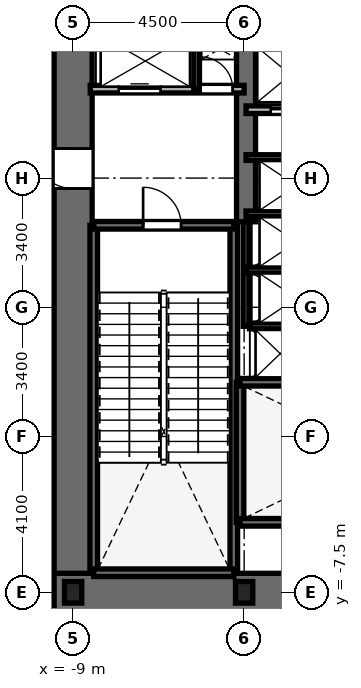
"""IFC4 building model, lengths in metres.
Left out: names, types, materials, properties, quantities, classifications, styles, units other than length and angle.
Written with IfcOpenShell. Run it as: python <this file> out.ifc"""

import sys

from ifc_helpers import new_model, si_unit, direction, frame, frame_2d, origin, origin_2d, place, context, subcontext, project, spatial, rectangle, i_section, extrude, element, fill, save


model = new_model("IFC4")
c1 = context("Model", 3, precision=1e-05, world=origin(), true_north=direction((0.0, 1.0)))
c2 = subcontext(c1, "Body", "Model", "MODEL_VIEW")
j1 = project(units=[si_unit("LENGTHUNIT", "METRE"), si_unit("PLANEANGLEUNIT", "RADIAN")], contexts=[c1])
p1 = place(None, origin())
s1 = spatial("IfcSite", under=j1, at=p1, CompositionType="ELEMENT")
p2 = place(p1, origin())
s2 = spatial("IfcBuilding", under=s1, at=p2, CompositionType="ELEMENT")
p3 = place(p2, origin())
s3 = spatial("IfcBuildingStorey", under=s2, at=p3, CompositionType="ELEMENT", Elevation=0.0)
p4 = place(p3, frame((-9.5, -7.5, 0.0), z_axis=(0.0, 0.0, 1.0), x_axis=(1.0, 0.0, 0.0)))
e1 = element("IfcWall", 1, at=p4, inside=s3, PredefinedType="SHEAR", context=c2, shape_type="SweptSolid", body=[
    extrude(rectangle(XDim=19.0, YDim=1.0, at=frame_2d((9.5, 0.0))), origin(), (0.0, 0.0, 1.0), 6.0),
])
p5 = place(p4, frame((9.55, 0.0, 0.0)))
e2 = element("IfcOpeningElement", 2, at=p5, cuts=e1, PredefinedType="OPENING", context=c2, shape_type="SweptSolid", body=[
    extrude(rectangle(XDim=1.0, YDim=2.15, at=frame_2d((0.5, 1.075))), frame((0.0, 0.51, 0.0), z_axis=(0.0, -1.0, 0.0), x_axis=(1.0, 0.0, 0.0)), (0.0, 0.0, 1.0), 1.02),
])
p6 = place(p3, frame((-9.0, -7.0, 0.0), z_axis=(0.0, 0.0, 1.0), x_axis=(0.0, 1.0, 0.0)))
e3 = element("IfcWall", 3, at=p6, inside=s3, PredefinedType="SHEAR", context=c2, shape_type="SweptSolid", body=[
    extrude(rectangle(XDim=14.0, YDim=1.0, at=frame_2d((7.0, 0.0))), origin(), (0.0, 0.0, 1.0), 6.0),
])
p7 = place(p6, frame((10.125, 0.0, 0.0)))
e4 = element("IfcOpeningElement", 4, at=p7, cuts=e3, PredefinedType="OPENING", context=c2, shape_type="SweptSolid", body=[
    extrude(rectangle(XDim=1.05, YDim=2.15, at=frame_2d((0.525, 1.075))), frame((0.0, 0.51, 0.0), z_axis=(0.0, -1.0, 0.0), x_axis=(1.0, 0.0, 0.0)), (0.0, 0.0, 1.0), 1.02),
])
p8 = place(p3, frame((-4.45, 2.25, 0.0), z_axis=(0.0, 0.0, 1.0), x_axis=(0.0, 1.0, 0.0)))
e5 = element("IfcWall", 5, at=p8, inside=s3, PredefinedType="SHEAR", context=c2, shape_type="SweptSolid", body=[
    extrude(rectangle(XDim=4.75, YDim=0.5, at=frame_2d((2.375, 0.0))), origin(), (0.0, 0.0, 1.0), 6.0),
])
for number, where, z_axis, x_axis in (
    (6, (-8.458, -6.985, 0.0), (0.0, 0.0, 1.0), (0.0, 1.0, 0.0)),
    (7, (-4.772, -6.985, 0.0), (0.0, 0.0, 1.0), (0.0, 1.0, 0.0)),
):
    element("IfcWall", number, at=place(p3, frame(where, z_axis=z_axis, x_axis=x_axis)), inside=s3, PredefinedType="SHEAR", context=c2, shape_type="SweptSolid", body=[
        extrude(rectangle(XDim=9.143, YDim=0.2, at=frame_2d((4.572, 0.0))), origin(), (0.0, 0.0, 1.0), 6.0),
    ])
p9 = place(p3, frame((-8.458, -6.985, 0.0), z_axis=(0.0, 0.0, 1.0), x_axis=(1.0, 0.0, 0.0)))
e8 = element("IfcWall", 8, at=p9, inside=s3, PredefinedType="SHEAR", context=c2, shape_type="SweptSolid", body=[
    extrude(rectangle(XDim=3.686, YDim=0.2, at=frame_2d((1.843, 0.0))), origin(), (0.0, 0.0, 1.0), 6.0),
])
p10 = place(p3, frame((-8.458, 2.158, 0.0), z_axis=(0.0, 0.0, 1.0), x_axis=(1.0, 0.0, 0.0)))
e9 = element("IfcWall", 9, at=p10, inside=s3, PredefinedType="SHEAR", context=c2, shape_type="SweptSolid", body=[
    extrude(rectangle(XDim=3.686, YDim=0.2, at=frame_2d((1.843, 0.0))), origin(), (0.0, 0.0, 1.0), 6.0),
])
p11 = place(p10, frame((1.3, 0.0, 0.0)))
e10 = element("IfcOpeningElement", 10, at=p11, cuts=e9, PredefinedType="OPENING", context=c2, shape_type="SweptSolid", body=[
    extrude(rectangle(XDim=1.0, YDim=2.15, at=frame_2d((0.5, 1.075))), frame((0.0, 0.11, 0.0), z_axis=(0.0, -1.0, 0.0), x_axis=(1.0, 0.0, 0.0)), (0.0, 0.0, 1.0), 0.22),
])
p12 = place(p3, frame((-4.608, -5.658, 0.0), z_axis=(0.0, 0.0, 1.0), x_axis=(0.0, 1.0, 0.0)))
e11 = element("IfcWall", 11, at=p12, inside=s3, PredefinedType="SHEAR", context=c2, shape_type="SweptSolid", body=[
    extrude(rectangle(XDim=3.686, YDim=0.2, at=frame_2d((1.843, 0.0))), origin(), (0.0, 0.0, 1.0), 6.0),
])
p13 = place(p3, frame((-4.608, -5.658, 0.0), z_axis=(0.0, 0.0, 1.0), x_axis=(1.0, 0.0, 0.0)))
e12 = element("IfcWall", 12, at=p13, inside=s3, PredefinedType="SHEAR", context=c2, shape_type="SweptSolid", body=[
    extrude(rectangle(XDim=9.166, YDim=0.2, at=frame_2d((4.583, 0.0))), origin(), (0.0, 0.0, 1.0), 6.0),
])
p14 = place(p13, frame((7.45, 0.0, 0.0)))
e13 = element("IfcOpeningElement", 13, at=p14, cuts=e12, PredefinedType="OPENING", context=c2, shape_type="SweptSolid", body=[
    extrude(rectangle(XDim=1.0, YDim=2.15, at=frame_2d((0.5, 1.075))), frame((0.0, 0.11, 0.0), z_axis=(0.0, -1.0, 0.0), x_axis=(1.0, 0.0, 0.0)), (0.0, 0.0, 1.0), 0.22),
])
p15 = place(p3, frame((-4.608, -1.972, 0.0), z_axis=(0.0, 0.0, 1.0), x_axis=(1.0, 0.0, 0.0)))
e14 = element("IfcWall", 14, at=p15, inside=s3, PredefinedType="SHEAR", context=c2, shape_type="SweptSolid", body=[
    extrude(rectangle(XDim=9.166, YDim=0.2, at=frame_2d((4.583, 0.0))), origin(), (0.0, 0.0, 1.0), 6.0),
])
for number, where, z_axis, x_axis in (
    (15, (-9.0, -7.5, 0.0), (0.0, 0.0, 1.0), (1.0, 0.0, 0.0)),
    (16, (-4.5, -7.5, 0.0), (0.0, 0.0, 1.0), (1.0, 0.0, 0.0)),
):
    element("IfcColumn", number, at=place(p3, frame(where, z_axis=z_axis, x_axis=x_axis)), inside=s3, PredefinedType="COLUMN", context=c2, shape_type="SweptSolid", body=[
        extrude(i_section(OverallWidth=0.454, OverallDepth=0.569, WebThickness=0.078, FlangeThickness=0.125, at=origin_2d()), origin(), (0.0, 0.0, 1.0), 6.0),
    ])
p16 = place(p3, frame((-8.55, 5.74, 0.0), z_axis=(0.0, 0.0, 1.0), x_axis=(1.0, 0.0, 0.0)))
e17 = element("IfcWall", 17, at=p16, inside=s3, PredefinedType="PARTITIONING", context=c2, shape_type="SweptSolid", body=[
    extrude(rectangle(XDim=4.05, YDim=0.2, at=frame_2d((2.025, 0.0))), origin(), (0.0, 0.0, 1.0), 5.68),
])
p17 = place(p16, frame((0.75, 0.0, 0.0)))
e18 = element("IfcOpeningElement", 18, at=p17, cuts=e17, PredefinedType="OPENING", context=c2, shape_type="SweptSolid", body=[
    extrude(rectangle(XDim=1.1, YDim=2.2, at=frame_2d((0.55, 1.1))), frame((0.0, 0.11, 0.0), z_axis=(0.0, -1.0, 0.0), x_axis=(1.0, 0.0, 0.0)), (0.0, 0.0, 1.0), 0.22),
])
p18 = place(p16, frame((2.9, 0.0, 0.0)))
e19 = element("IfcOpeningElement", 19, at=p18, cuts=e17, PredefinedType="OPENING", context=c2, shape_type="SweptSolid", body=[
    extrude(rectangle(XDim=0.85, YDim=2.03, at=frame_2d((0.425, 1.015))), frame((0.0, 0.11, 0.0), z_axis=(0.0, -1.0, 0.0), x_axis=(1.0, 0.0, 0.0)), (0.0, 0.0, 1.0), 0.22),
])
p19 = place(p3, frame((-5.75, 5.74, 0.0), z_axis=(0.0, 0.0, 1.0), x_axis=(0.0, 1.0, 0.0)))
e20 = element("IfcWall", 20, at=p19, inside=s3, PredefinedType="PARTITIONING", context=c2, shape_type="SweptSolid", body=[
    extrude(rectangle(XDim=1.41, YDim=0.15, at=frame_2d((0.705, 0.0))), origin(), (0.0, 0.0, 1.0), 5.68),
])
p20 = place(p3, frame((-4.45, 5.2, 0.0), z_axis=(0.0, 0.0, 1.0), x_axis=(1.0, 0.0, 0.0)))
e21 = element("IfcWall", 21, at=p20, inside=s3, PredefinedType="PARTITIONING", context=c2, shape_type="SweptSolid", body=[
    extrude(rectangle(XDim=4.5, YDim=0.2, at=frame_2d((2.25, 0.0))), origin(), (0.0, 0.0, 1.0), 5.68),
])
p21 = place(p20, frame((0.65, 0.0, 0.0)))
e22 = element("IfcOpeningElement", 22, at=p21, cuts=e21, PredefinedType="OPENING", context=c2, shape_type="SweptSolid", body=[
    extrude(rectangle(XDim=1.0, YDim=2.2, at=frame_2d((0.5, 1.1))), frame((0.0, 0.11, 0.0), z_axis=(0.0, -1.0, 0.0), x_axis=(1.0, 0.0, 0.0)), (0.0, 0.0, 1.0), 0.22),
])
p22 = place(p20, frame((2.85, 0.0, 0.0)))
e23 = element("IfcOpeningElement", 23, at=p22, cuts=e21, PredefinedType="OPENING", context=c2, shape_type="SweptSolid", body=[
    extrude(rectangle(XDim=1.0, YDim=2.2, at=frame_2d((0.5, 1.1))), frame((0.0, 0.11, 0.0), z_axis=(0.0, -1.0, 0.0), x_axis=(1.0, 0.0, 0.0)), (0.0, 0.0, 1.0), 0.22),
])
p23 = place(p3, frame((-4.45, -0.5, 0.0), z_axis=(0.0, 0.0, 1.0), x_axis=(0.0, 1.0, 0.0)))
e24 = element("IfcWall", 24, at=p23, inside=s3, PredefinedType="PARTITIONING", context=c2, shape_type="SweptSolid", body=[
    extrude(rectangle(XDim=2.75, YDim=0.15, at=frame_2d((1.375, 0.0))), origin(), (0.0, 0.0, 1.0), 5.68),
])
for number, where, z_axis, x_axis in (
    (25, (-4.45, 3.94, 0.0), (0.0, 0.0, 1.0), (1.0, 0.0, 0.0)),
    (26, (-4.45, 0.98, 0.0), (0.0, 0.0, 1.0), (1.0, 0.0, 0.0)),
    (27, (-4.45, 2.46, 0.0), (0.0, 0.0, 1.0), (1.0, 0.0, 0.0)),
):
    element("IfcWall", number, at=place(p3, frame(where, z_axis=z_axis, x_axis=x_axis)), inside=s3, PredefinedType="PARTITIONING", context=c2, shape_type="SweptSolid", body=[
        extrude(rectangle(XDim=2.55, YDim=0.15, at=frame_2d((1.275, 0.0))), origin(), (0.0, 0.0, 1.0), 5.68),
    ])
p24 = place(p3, frame((-4.36, -0.49, 0.0), z_axis=(0.0, 0.0, 1.0), x_axis=(1.0, 0.0, 0.0)))
e28 = element("IfcWall", 28, at=p24, inside=s3, PredefinedType="PARTITIONING", context=c2, shape_type="SweptSolid", body=[
    extrude(rectangle(XDim=8.72, YDim=0.15, at=frame_2d((4.36, 0.0))), origin(), (0.0, 0.0, 1.0), 5.68),
])
p25 = place(p24, frame((3.86, 0.0, 0.0)))
e29 = element("IfcOpeningElement", 29, at=p25, cuts=e28, PredefinedType="OPENING", context=c2, shape_type="SweptSolid", body=[
    extrude(rectangle(XDim=0.9, YDim=2.03, at=frame_2d((0.45, 1.015))), frame((0.0, 0.085, 0.0), z_axis=(0.0, -1.0, 0.0), x_axis=(1.0, 0.0, 0.0)), (0.0, 0.0, 1.0), 0.17),
])
p26 = place(p11, origin())
e30 = element("IfcDoor", 30, at=p26, inside=s3, OperationType="SINGLE_SWING_LEFT", PredefinedType="DOOR", context=c2, shape_type="SweptSolid", body=[
    extrude(rectangle(XDim=1.0, YDim=2.15, at=frame_2d((0.5, 1.075))), frame((0.0, 0.025, 0.0), z_axis=(0.0, -1.0, 0.0), x_axis=(1.0, 0.0, 0.0)), (0.0, 0.0, 1.0), 0.05),
])
fill(e10, e30)
p27 = place(p7, origin())
e31 = element("IfcDoor", 31, at=p27, inside=s3, OperationType="SINGLE_SWING_RIGHT", PredefinedType="DOOR", context=c2, shape_type="SweptSolid", body=[
    extrude(rectangle(XDim=1.05, YDim=2.15, at=frame_2d((0.525, 1.075))), frame((0.0, 0.025, 0.0), z_axis=(0.0, -1.0, 0.0), x_axis=(1.0, 0.0, 0.0)), (0.0, 0.0, 1.0), 0.05),
])
fill(e4, e31)
p28 = place(p17, origin())
e32 = element("IfcDoor", 32, at=p28, inside=s3, OperationType="SLIDING_TO_LEFT", PredefinedType="DOOR", context=c2, shape_type="SweptSolid", body=[
    extrude(rectangle(XDim=1.1, YDim=2.2, at=frame_2d((0.55, 1.1))), frame((0.0, 0.025, 0.0), z_axis=(0.0, -1.0, 0.0), x_axis=(1.0, 0.0, 0.0)), (0.0, 0.0, 1.0), 0.05),
])
fill(e18, e32)
p29 = place(p18, origin())
e33 = element("IfcDoor", 33, at=p29, inside=s3, OperationType="SINGLE_SWING_LEFT", PredefinedType="DOOR", context=c2, shape_type="SweptSolid", body=[
    extrude(rectangle(XDim=0.85, YDim=2.03, at=frame_2d((0.425, 1.015))), frame((0.0, 0.025, 0.0), z_axis=(0.0, -1.0, 0.0), x_axis=(1.0, 0.0, 0.0)), (0.0, 0.0, 1.0), 0.05),
])
fill(e19, e33)
p30 = place(p21, origin())
e34 = element("IfcDoor", 34, at=p30, inside=s3, OperationType="SLIDING_TO_LEFT", PredefinedType="DOOR", context=c2, shape_type="SweptSolid", body=[
    extrude(rectangle(XDim=1.0, YDim=2.2, at=frame_2d((0.5, 1.1))), frame((0.0, 0.025, 0.0), z_axis=(0.0, -1.0, 0.0), x_axis=(1.0, 0.0, 0.0)), (0.0, 0.0, 1.0), 0.05),
])
fill(e22, e34)
save(model, sys.argv[1])
